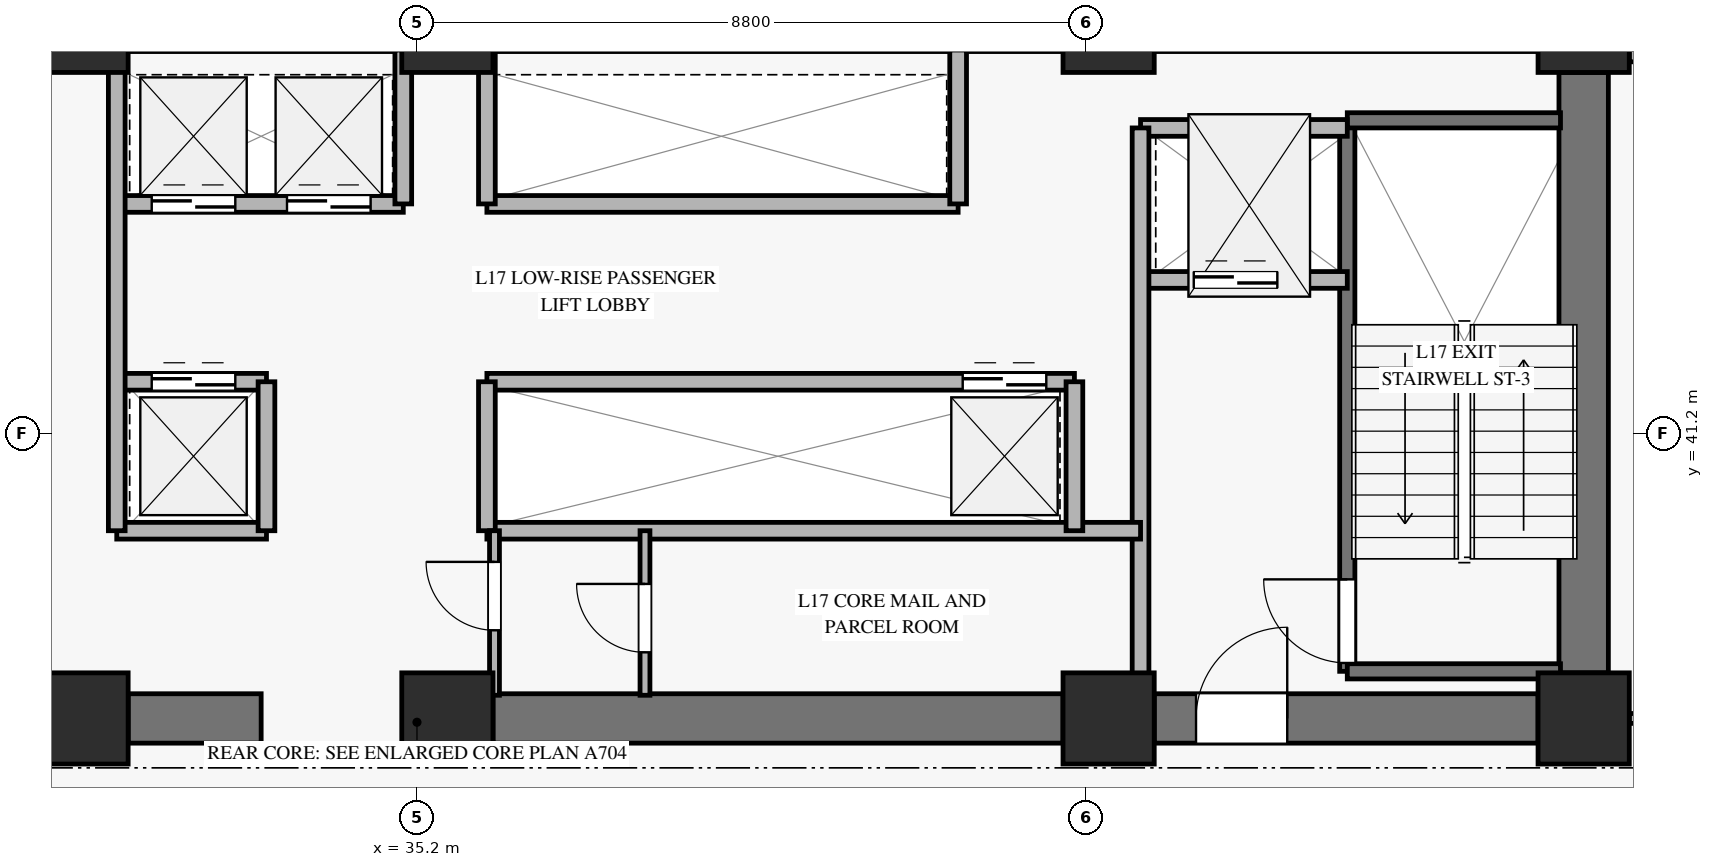
"""IFC4 building model, lengths in metres.
Left out: names, types, materials, properties, quantities, classifications, styles, units other than length and angle.
Written with IfcOpenShell. Run it as: python <this file> out.ifc"""

import sys

from ifc_helpers import new_model, si_unit, direction, frame, frame_2d, origin, origin_2d, place, context, subcontext, project, spatial, rectangle, extrude, source, transform, mapped, element, fill, save


model = new_model("IFC4")
c1 = context("Model", 3, precision=1e-05, world=origin(), true_north=direction((0.0, 1.0)))
c2 = subcontext(c1, "Body", "Model", "MODEL_VIEW")
j1 = project(units=[si_unit("LENGTHUNIT", "METRE"), si_unit("PLANEANGLEUNIT", "RADIAN")], contexts=[c1])
p1 = place(None, origin())
s1 = spatial("IfcSite", under=j1, at=p1, CompositionType="ELEMENT")
p2 = place(p1, origin())
s2 = spatial("IfcBuilding", under=s1, at=p2, CompositionType="ELEMENT")
p3 = place(p2, frame((0.0, 0.0, 68.9)))
s3 = spatial("IfcBuildingStorey", under=s2, at=p3, CompositionType="ELEMENT", Elevation=68.9)
m1 = source(origin(), c2, "Body", "SweptSolid", [
    extrude(rectangle(XDim=1.2, YDim=1.2, at=origin_2d()), origin(), (0.0, 0.0, 1.0), 3.64),
])
for number, where, z_axis, x_axis in (
    (1, (30.8, 37.45, 0.0), (0.0, 0.0, 1.0), (1.0, 0.0, 0.0)),
    (2, (30.8, 46.55, 0.0), (0.0, 0.0, 1.0), (1.0, 0.0, 0.0)),
    (3, (35.6, 37.45, 0.0), (0.0, 0.0, 1.0), (1.0, 0.0, 0.0)),
    (4, (35.6, 46.55, 0.0), (0.0, 0.0, 1.0), (1.0, 0.0, 0.0)),
    (5, (44.3, 37.45, 0.0), (0.0, 0.0, 1.0), (1.0, 0.0, 0.0)),
    (6, (44.3, 46.55, 0.0), (0.0, 0.0, 1.0), (1.0, 0.0, 0.0)),
    (7, (50.55, 37.45, 0.0), (0.0, 0.0, 1.0), (1.0, 0.0, 0.0)),
    (8, (50.55, 46.55, 0.0), (0.0, 0.0, 1.0), (1.0, 0.0, 0.0)),
):
    element("IfcColumn", number, at=place(p3, frame(where, z_axis=z_axis, x_axis=x_axis)), inside=s3, PredefinedType="PILASTER", context=c2, shape_type="MappedRepresentation", body=[
        mapped(m1, transform((0.0, 0.0, 0.0), x_axis=(1.0, 0.0, 0.0), y_axis=(0.0, 1.0, 0.0), z_axis=(0.0, 0.0, 1.0), scale=1.0)),
    ])
p4 = place(p3, frame((31.4, 37.45, 0.0), z_axis=(0.0, 0.0, 1.0), x_axis=(1.0, 0.0, 0.0)))
e9 = element("IfcWall", 9, at=p4, inside=s3, PredefinedType="SHEAR", context=c2, shape_type="SweptSolid", body=[
    extrude(rectangle(XDim=1.75, YDim=0.65, at=frame_2d((0.875, 0.0))), origin(), (0.0, 0.0, 1.0), 3.64),
])
p5 = place(p3, frame((36.2, 37.45, 0.0), z_axis=(0.0, 0.0, 1.0), x_axis=(1.0, 0.0, 0.0)))
e10 = element("IfcWall", 10, at=p5, inside=s3, PredefinedType="SHEAR", context=c2, shape_type="SweptSolid", body=[
    extrude(rectangle(XDim=7.5, YDim=0.65, at=frame_2d((3.75, 0.0))), origin(), (0.0, 0.0, 1.0), 3.64),
])
p6 = place(p3, frame((44.9, 37.45, 0.0), z_axis=(0.0, 0.0, 1.0), x_axis=(1.0, 0.0, 0.0)))
e11 = element("IfcWall", 11, at=p6, inside=s3, PredefinedType="SHEAR", context=c2, shape_type="SweptSolid", body=[
    extrude(rectangle(XDim=5.05, YDim=0.65, at=frame_2d((2.525, 0.0))), origin(), (0.0, 0.0, 1.0), 3.64),
])
p7 = place(p6, frame((0.55, 0.0, 0.0)))
e12 = element("IfcOpeningElement", 12, at=p7, cuts=e11, PredefinedType="OPENING", context=c2, shape_type="SweptSolid", body=[
    extrude(rectangle(XDim=1.2, YDim=2.15, at=frame_2d((0.6, 1.075))), frame((0.0, 0.335, 0.0), z_axis=(0.0, -1.0, 0.0), x_axis=(1.0, 0.0, 0.0)), (0.0, 0.0, 1.0), 0.67),
])
p8 = place(p3, frame((50.55, 38.05, 0.0), z_axis=(0.0, 0.0, 1.0), x_axis=(0.0, 1.0, 0.0)))
e13 = element("IfcWall", 13, at=p8, inside=s3, PredefinedType="SHEAR", context=c2, shape_type="SweptSolid", body=[
    extrude(rectangle(XDim=7.9, YDim=0.65, at=frame_2d((3.95, 0.0))), origin(), (0.0, 0.0, 1.0), 3.64),
])
p9 = place(p3, frame((51.15, 46.25, 0.0), z_axis=(0.0, 0.0, 1.0), x_axis=(1.0, 0.0, 0.0)))
e14 = element("IfcWall", 14, at=p9, inside=s3, PredefinedType="SOLIDWALL", context=c2, shape_type="SweptSolid", body=[
    extrude(rectangle(XDim=11.824, YDim=0.32, at=frame_2d((5.912, 0.0))), origin(), (0.0, 0.0, 1.0), 3.12),
])
p10 = place(p9, frame((5.112, 0.0, 0.45)))
e15 = element("IfcOpeningElement", 15, at=p10, cuts=e14, PredefinedType="OPENING", context=c2, shape_type="SweptSolid", body=[
    extrude(rectangle(XDim=1.6, YDim=2.0, at=frame_2d((0.8, 1.0))), frame((0.0, 0.17, 0.0), z_axis=(0.0, -1.0, 0.0), x_axis=(1.0, 0.0, 0.0)), (0.0, 0.0, 1.0), 0.34),
])
p11 = place(p3, frame((47.44, 38.07, 0.0), z_axis=(0.0, 0.0, 1.0), x_axis=(0.0, 1.0, 0.0)))
e16 = element("IfcWall", 16, at=p11, inside=s3, PredefinedType="SOLIDWALL", context=c2, shape_type="SweptSolid", body=[
    extrude(rectangle(XDim=7.25, YDim=0.2, at=frame_2d((3.625, 0.0))), origin(), (0.0, 0.0, 1.0), 3.9),
])
p12 = place(p11, frame((0.11, 0.0, 0.0)))
e17 = element("IfcOpeningElement", 17, at=p12, cuts=e16, PredefinedType="OPENING", context=c2, shape_type="SweptSolid", body=[
    extrude(rectangle(XDim=1.1, YDim=2.15, at=frame_2d((0.55, 1.075))), frame((0.0, 0.11, 0.0), z_axis=(0.0, -1.0, 0.0), x_axis=(1.0, 0.0, 0.0)), (0.0, 0.0, 1.0), 0.22),
])
for number, where, z_axis, x_axis in (
    (18, (47.44, 45.32, 0.0), (0.0, 0.0, 1.0), (1.0, 0.0, 0.0)),
    (19, (47.44, 38.07, 0.0), (0.0, 0.0, 1.0), (1.0, 0.0, 0.0)),
):
    element("IfcWall", number, at=place(p3, frame(where, z_axis=z_axis, x_axis=x_axis)), inside=s3, PredefinedType="SOLIDWALL", context=c2, shape_type="SweptSolid", body=[
        extrude(rectangle(XDim=2.805, YDim=0.2, at=frame_2d((1.403, 0.0))), origin(), (0.0, 0.0, 1.0), 3.9),
    ])
p13 = place(p3, frame((44.72, 43.22, 0.0), z_axis=(0.0, 0.0, 1.0), x_axis=(1.0, 0.0, 0.0)))
e20 = element("IfcWall", 20, at=p13, inside=s3, PredefinedType="SOLIDWALL", context=c2, shape_type="SweptSolid", body=[
    extrude(rectangle(XDim=2.72, YDim=0.22, at=frame_2d((1.36, 0.0))), origin(), (0.0, 0.0, 1.0), 3.64),
])
p14 = place(p13, frame((0.7, 0.0, 0.0)))
e21 = element("IfcOpeningElement", 21, at=p14, cuts=e20, PredefinedType="OPENING", context=c2, shape_type="SweptSolid", body=[
    extrude(rectangle(XDim=1.1, YDim=2.2, at=frame_2d((0.55, 1.1))), frame((0.0, 0.12, 0.0), z_axis=(0.0, -1.0, 0.0), x_axis=(1.0, 0.0, 0.0)), (0.0, 0.0, 1.0), 0.24),
])
p15 = place(p3, frame((44.72, 45.22, 0.0), z_axis=(0.0, 0.0, 1.0), x_axis=(1.0, 0.0, 0.0)))
e22 = element("IfcWall", 22, at=p15, inside=s3, PredefinedType="SOLIDWALL", context=c2, shape_type="SweptSolid", body=[
    extrude(rectangle(XDim=2.72, YDim=0.22, at=frame_2d((1.36, 0.0))), origin(), (0.0, 0.0, 1.0), 3.64),
])
p16 = place(p3, frame((44.72, 37.755, 0.0), z_axis=(0.0, 0.0, 1.0), x_axis=(0.0, 1.0, 0.0)))
e23 = element("IfcWall", 23, at=p16, inside=s3, PredefinedType="SOLIDWALL", context=c2, shape_type="SweptSolid", body=[
    extrude(rectangle(XDim=7.465, YDim=0.22, at=frame_2d((3.732, 0.0))), origin(), (0.0, 0.0, 1.0), 3.64),
])
p17 = place(p3, frame((31.25, 44.22, 0.0), z_axis=(0.0, 0.0, 1.0), x_axis=(1.0, 0.0, 0.0)))
e24 = element("IfcWall", 24, at=p17, inside=s3, PredefinedType="SOLIDWALL", context=c2, shape_type="SweptSolid", body=[
    extrude(rectangle(XDim=3.77, YDim=0.22, at=frame_2d((1.885, 0.0))), origin(), (0.0, 0.0, 1.0), 3.64),
])
p18 = place(p17, frame((0.46, 0.0, 0.0)))
e25 = element("IfcOpeningElement", 25, at=p18, cuts=e24, PredefinedType="OPENING", context=c2, shape_type="SweptSolid", body=[
    extrude(rectangle(XDim=1.1, YDim=2.2, at=frame_2d((0.55, 1.1))), frame((0.0, 0.12, 0.0), z_axis=(0.0, -1.0, 0.0), x_axis=(1.0, 0.0, 0.0)), (0.0, 0.0, 1.0), 0.24),
])
p19 = place(p17, frame((2.24, 0.0, 0.0)))
e26 = element("IfcOpeningElement", 26, at=p19, cuts=e24, PredefinedType="OPENING", context=c2, shape_type="SweptSolid", body=[
    extrude(rectangle(XDim=1.1, YDim=2.2, at=frame_2d((0.55, 1.1))), frame((0.0, 0.12, 0.0), z_axis=(0.0, -1.0, 0.0), x_axis=(1.0, 0.0, 0.0)), (0.0, 0.0, 1.0), 0.24),
])
p20 = place(p3, frame((36.12, 44.22, 0.0), z_axis=(0.0, 0.0, 1.0), x_axis=(1.0, 0.0, 0.0)))
e27 = element("IfcWall", 27, at=p20, inside=s3, PredefinedType="SOLIDWALL", context=c2, shape_type="SweptSolid", body=[
    extrude(rectangle(XDim=6.2, YDim=0.22, at=frame_2d((3.1, 0.0))), origin(), (0.0, 0.0, 1.0), 3.64),
])
for number, where, z_axis, x_axis in (
    (28, (35.02, 44.22, 0.0), (0.0, 0.0, 1.0), (0.0, 1.0, 0.0)),
    (29, (36.12, 44.22, 0.0), (0.0, 0.0, 1.0), (0.0, 1.0, 0.0)),
    (30, (42.32, 44.22, 0.0), (0.0, 0.0, 1.0), (0.0, 1.0, 0.0)),
):
    element("IfcWall", number, at=place(p3, frame(where, z_axis=z_axis, x_axis=x_axis)), inside=s3, PredefinedType="SOLIDWALL", context=c2, shape_type="SweptSolid", body=[
        extrude(rectangle(XDim=2.025, YDim=0.22, at=frame_2d((1.013, 0.0))), origin(), (0.0, 0.0, 1.0), 3.64),
    ])
p21 = place(p3, frame((31.25, 41.88, 0.0), z_axis=(0.0, 0.0, 1.0), x_axis=(1.0, 0.0, 0.0)))
e31 = element("IfcWall", 31, at=p21, inside=s3, PredefinedType="SOLIDWALL", context=c2, shape_type="SweptSolid", body=[
    extrude(rectangle(XDim=1.97, YDim=0.22, at=frame_2d((0.985, 0.0))), origin(), (0.0, 0.0, 1.0), 3.64),
])
p22 = place(p21, frame((0.46, 0.0, 0.0)))
e32 = element("IfcOpeningElement", 32, at=p22, cuts=e31, PredefinedType="OPENING", context=c2, shape_type="SweptSolid", body=[
    extrude(rectangle(XDim=1.1, YDim=2.2, at=frame_2d((0.55, 1.1))), frame((0.0, 0.12, 0.0), z_axis=(0.0, -1.0, 0.0), x_axis=(1.0, 0.0, 0.0)), (0.0, 0.0, 1.0), 0.24),
])
p23 = place(p3, frame((36.12, 41.88, 0.0), z_axis=(0.0, 0.0, 1.0), x_axis=(1.0, 0.0, 0.0)))
e33 = element("IfcWall", 33, at=p23, inside=s3, PredefinedType="SOLIDWALL", context=c2, shape_type="SweptSolid", body=[
    extrude(rectangle(XDim=7.73, YDim=0.22, at=frame_2d((3.865, 0.0))), origin(), (0.0, 0.0, 1.0), 3.64),
])
p24 = place(p23, frame((6.26, 0.0, 0.0)))
e34 = element("IfcOpeningElement", 34, at=p24, cuts=e33, PredefinedType="OPENING", context=c2, shape_type="SweptSolid", body=[
    extrude(rectangle(XDim=1.1, YDim=2.2, at=frame_2d((0.55, 1.1))), frame((0.0, 0.12, 0.0), z_axis=(0.0, -1.0, 0.0), x_axis=(1.0, 0.0, 0.0)), (0.0, 0.0, 1.0), 0.24),
])
p25 = place(p3, frame((31.25, 39.92, 0.0), z_axis=(0.0, 0.0, 1.0), x_axis=(1.0, 0.0, 0.0)))
e35 = element("IfcWall", 35, at=p25, inside=s3, PredefinedType="SOLIDWALL", context=c2, shape_type="SweptSolid", body=[
    extrude(rectangle(XDim=1.97, YDim=0.22, at=frame_2d((0.985, 0.0))), origin(), (0.0, 0.0, 1.0), 3.64),
])
p26 = place(p3, frame((33.22, 39.92, 0.0), z_axis=(0.0, 0.0, 1.0), x_axis=(0.0, 1.0, 0.0)))
e36 = element("IfcWall", 36, at=p26, inside=s3, PredefinedType="SOLIDWALL", context=c2, shape_type="SweptSolid", body=[
    extrude(rectangle(XDim=1.96, YDim=0.22, at=frame_2d((0.98, 0.0))), origin(), (0.0, 0.0, 1.0), 3.64),
])
p27 = place(p3, frame((36.12, 39.92, 0.0), z_axis=(0.0, 0.0, 1.0), x_axis=(1.0, 0.0, 0.0)))
e37 = element("IfcWall", 37, at=p27, inside=s3, PredefinedType="SOLIDWALL", context=c2, shape_type="SweptSolid", body=[
    extrude(rectangle(XDim=8.6, YDim=0.22, at=frame_2d((4.3, 0.0))), origin(), (0.0, 0.0, 1.0), 2.925),
])
p28 = place(p3, frame((36.12, 39.92, 0.0), z_axis=(0.0, 0.0, 1.0), x_axis=(0.0, 1.0, 0.0)))
e38 = element("IfcWall", 38, at=p28, inside=s3, PredefinedType="SOLIDWALL", context=c2, shape_type="SweptSolid", body=[
    extrude(rectangle(XDim=1.96, YDim=0.22, at=frame_2d((0.98, 0.0))), origin(), (0.0, 0.0, 1.0), 3.64),
])
p29 = place(p3, frame((31.25, 39.92, 0.0), z_axis=(0.0, 0.0, 1.0), x_axis=(0.0, 1.0, 0.0)))
e39 = element("IfcWall", 39, at=p29, inside=s3, PredefinedType="SOLIDWALL", context=c2, shape_type="SweptSolid", body=[
    extrude(rectangle(XDim=6.325, YDim=0.22, at=frame_2d((3.163, 0.0))), origin(), (0.0, 0.0, 1.0), 3.64),
])
p30 = place(p3, frame((43.85, 39.92, 0.0), z_axis=(0.0, 0.0, 1.0), x_axis=(0.0, 1.0, 0.0)))
e40 = element("IfcWall", 40, at=p30, inside=s3, PredefinedType="SOLIDWALL", context=c2, shape_type="SweptSolid", body=[
    extrude(rectangle(XDim=1.96, YDim=0.22, at=frame_2d((0.98, 0.0))), origin(), (0.0, 0.0, 1.0), 3.64),
])
p31 = place(p3, frame((36.22, 37.755, 0.0), z_axis=(0.0, 0.0, 1.0), x_axis=(0.0, 1.0, 0.0)))
e41 = element("IfcWall", 41, at=p31, inside=s3, PredefinedType="PARTITIONING", context=c2, shape_type="SweptSolid", body=[
    extrude(rectangle(XDim=2.165, YDim=0.13, at=frame_2d((1.083, 0.0))), origin(), (0.0, 0.0, 1.0), 3.64),
])
p32 = place(p31, frame((0.855, 0.0, 0.0)))
e42 = element("IfcOpeningElement", 42, at=p32, cuts=e41, PredefinedType="OPENING", context=c2, shape_type="SweptSolid", body=[
    extrude(rectangle(XDim=0.9, YDim=2.1, at=frame_2d((0.45, 1.05))), frame((0.0, 0.075, 0.0), z_axis=(0.0, -1.0, 0.0), x_axis=(1.0, 0.0, 0.0)), (0.0, 0.0, 1.0), 0.15),
])
p33 = place(p3, frame((38.2, 37.755, 0.0), z_axis=(0.0, 0.0, 1.0), x_axis=(0.0, 1.0, 0.0)))
e43 = element("IfcWall", 43, at=p33, inside=s3, PredefinedType="PARTITIONING", context=c2, shape_type="SweptSolid", body=[
    extrude(rectangle(XDim=2.165, YDim=0.13, at=frame_2d((1.083, 0.0))), origin(), (0.0, 0.0, 1.0), 3.64),
])
p34 = place(p33, frame((0.565, 0.0, 0.0)))
e44 = element("IfcOpeningElement", 44, at=p34, cuts=e43, PredefinedType="OPENING", context=c2, shape_type="SweptSolid", body=[
    extrude(rectangle(XDim=0.9, YDim=2.1, at=frame_2d((0.45, 1.05))), frame((0.0, 0.075, 0.0), z_axis=(0.0, -1.0, 0.0), x_axis=(1.0, 0.0, 0.0)), (0.0, 0.0, 1.0), 0.15),
])
p35 = place(p3, frame((51.15, 37.45, 0.0), z_axis=(0.0, 0.0, 1.0), x_axis=(1.0, 0.0, 0.0)))
e45 = element("IfcWall", 45, at=p35, inside=s3, PredefinedType="PARTITIONING", context=c2, shape_type="SweptSolid", body=[
    extrude(rectangle(XDim=15.446, YDim=0.13, at=frame_2d((7.723, 0.0))), origin(), (0.0, 0.0, 1.0), 3.125),
])
p36 = place(p35, frame((0.5, 0.0, 0.0)))
e46 = element("IfcOpeningElement", 46, at=p36, cuts=e45, PredefinedType="OPENING", context=c2, shape_type="SweptSolid", body=[
    extrude(rectangle(XDim=0.9, YDim=2.1, at=frame_2d((0.45, 1.05))), frame((0.0, 0.075, 0.0), z_axis=(0.0, -1.0, 0.0), x_axis=(1.0, 0.0, 0.0)), (0.0, 0.0, 1.0), 0.15),
])
p37 = place(p35, frame((11.088, 0.0, 0.0)))
e47 = element("IfcOpeningElement", 47, at=p37, cuts=e45, PredefinedType="OPENING", context=c2, shape_type="SweptSolid", body=[
    extrude(rectangle(XDim=0.95, YDim=2.1, at=frame_2d((0.475, 1.05))), frame((0.0, 0.075, 0.0), z_axis=(0.0, -1.0, 0.0), x_axis=(1.0, 0.0, 0.0)), (0.0, 0.0, 1.0), 0.15),
])
m2 = source(origin(), c2, "Body", "SweptSolid", [
    extrude(rectangle(XDim=1.1, YDim=2.15, at=frame_2d((0.55, 1.075))), frame((0.0, 0.025, 0.0), z_axis=(0.0, -1.0, 0.0), x_axis=(1.0, 0.0, 0.0)), (0.0, 0.0, 1.0), 0.05),
])
p38 = place(p12, origin())
e48 = element("IfcDoor", 48, at=p38, inside=s3, OperationType="SINGLE_SWING_RIGHT", PredefinedType="DOOR", context=c2, shape_type="MappedRepresentation", body=[
    mapped(m2, transform((0.0, 0.0, 0.0), x_axis=(1.0, 0.0, 0.0), y_axis=(0.0, 1.0, 0.0), z_axis=(0.0, 0.0, 1.0), scale=1.0)),
])
fill(e17, e48)
m3 = source(origin(), c2, "Body", "SweptSolid", [
    extrude(rectangle(XDim=1.1, YDim=2.2, at=frame_2d((0.55, 1.1))), frame((0.0, 0.025, 0.0), z_axis=(0.0, -1.0, 0.0), x_axis=(1.0, 0.0, 0.0)), (0.0, 0.0, 1.0), 0.05),
])
p39 = place(p14, origin())
e49 = element("IfcDoor", 49, at=p39, inside=s3, OperationType="SLIDING_TO_LEFT", PredefinedType="DOOR", context=c2, shape_type="MappedRepresentation", body=[
    mapped(m3, transform((0.0, 0.0, 0.0), x_axis=(1.0, 0.0, 0.0), y_axis=(0.0, 1.0, 0.0), z_axis=(0.0, 0.0, 1.0), scale=1.0)),
])
fill(e21, e49)
m4 = source(origin(), c2, "Body", "SweptSolid", [
    extrude(rectangle(XDim=1.2, YDim=2.15, at=frame_2d((0.6, 1.075))), frame((0.0, 0.025, 0.0), z_axis=(0.0, -1.0, 0.0), x_axis=(1.0, 0.0, 0.0)), (0.0, 0.0, 1.0), 0.05),
])
p40 = place(p7, origin())
e50 = element("IfcDoor", 50, at=p40, inside=s3, OperationType="SINGLE_SWING_RIGHT", PredefinedType="DOOR", context=c2, shape_type="MappedRepresentation", body=[
    mapped(m4, transform((0.0, 0.0, 0.0), x_axis=(1.0, 0.0, 0.0), y_axis=(0.0, 1.0, 0.0), z_axis=(0.0, 0.0, 1.0), scale=1.0)),
])
fill(e12, e50)
p41 = place(p18, origin())
e51 = element("IfcDoor", 51, at=p41, inside=s3, OperationType="SLIDING_TO_LEFT", PredefinedType="DOOR", context=c2, shape_type="MappedRepresentation", body=[
    mapped(m3, transform((0.0, 0.0, 0.0), x_axis=(1.0, 0.0, 0.0), y_axis=(0.0, 1.0, 0.0), z_axis=(0.0, 0.0, 1.0), scale=1.0)),
])
fill(e25, e51)
p42 = place(p19, origin())
e52 = element("IfcDoor", 52, at=p42, inside=s3, OperationType="SLIDING_TO_LEFT", PredefinedType="DOOR", context=c2, shape_type="MappedRepresentation", body=[
    mapped(m3, transform((0.0, 0.0, 0.0), x_axis=(1.0, 0.0, 0.0), y_axis=(0.0, 1.0, 0.0), z_axis=(0.0, 0.0, 1.0), scale=1.0)),
])
fill(e26, e52)
p43 = place(p22, origin())
e53 = element("IfcDoor", 53, at=p43, inside=s3, OperationType="SLIDING_TO_LEFT", PredefinedType="DOOR", context=c2, shape_type="MappedRepresentation", body=[
    mapped(m3, transform((0.0, 0.0, 0.0), x_axis=(1.0, 0.0, 0.0), y_axis=(0.0, 1.0, 0.0), z_axis=(0.0, 0.0, 1.0), scale=1.0)),
])
fill(e32, e53)
p44 = place(p24, origin())
e54 = element("IfcDoor", 54, at=p44, inside=s3, OperationType="SLIDING_TO_LEFT", PredefinedType="DOOR", context=c2, shape_type="MappedRepresentation", body=[
    mapped(m3, transform((0.0, 0.0, 0.0), x_axis=(1.0, 0.0, 0.0), y_axis=(0.0, 1.0, 0.0), z_axis=(0.0, 0.0, 1.0), scale=1.0)),
])
fill(e34, e54)
m5 = source(origin(), c2, "Body", "SweptSolid", [
    extrude(rectangle(XDim=0.9, YDim=2.1, at=frame_2d((0.45, 1.05))), frame((0.0, 0.025, 0.0), z_axis=(0.0, -1.0, 0.0), x_axis=(1.0, 0.0, 0.0)), (0.0, 0.0, 1.0), 0.05),
])
p45 = place(p32, origin())
e55 = element("IfcDoor", 55, at=p45, inside=s3, OperationType="SINGLE_SWING_RIGHT", PredefinedType="DOOR", context=c2, shape_type="MappedRepresentation", body=[
    mapped(m5, transform((0.0, 0.0, 0.0), x_axis=(1.0, 0.0, 0.0), y_axis=(0.0, 1.0, 0.0), z_axis=(0.0, 0.0, 1.0), scale=1.0)),
])
fill(e42, e55)
p46 = place(p34, origin())
e56 = element("IfcDoor", 56, at=p46, inside=s3, OperationType="SINGLE_SWING_RIGHT", PredefinedType="DOOR", context=c2, shape_type="MappedRepresentation", body=[
    mapped(m5, transform((0.0, 0.0, 0.0), x_axis=(1.0, 0.0, 0.0), y_axis=(0.0, 1.0, 0.0), z_axis=(0.0, 0.0, 1.0), scale=1.0)),
])
fill(e44, e56)
save(model, sys.argv[1])
